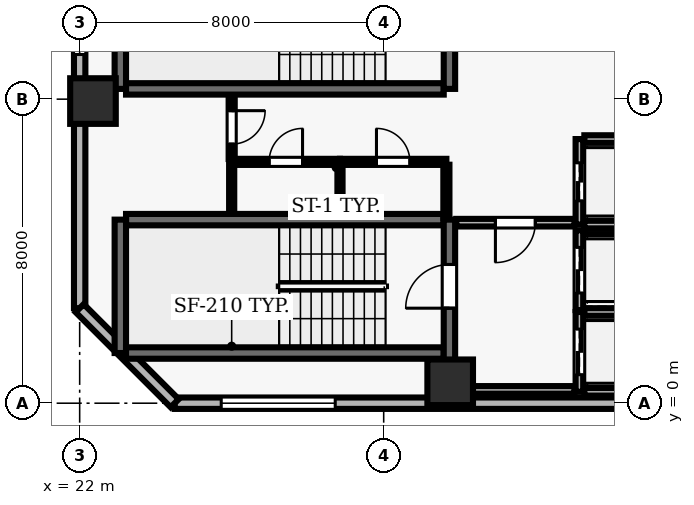
"""IFC4 building model, lengths in metres.
Left out: names, types, materials, properties, quantities, classifications, styles, units other than length and angle.
Written with IfcOpenShell. Run it as: python <this file> out.ifc"""

import sys

from ifc_helpers import new_model, si_unit, direction, frame, frame_2d, origin, origin_2d, place, context, subcontext, project, spatial, rectangle, extrude, element, fill, save


model = new_model("IFC4")
c1 = context("Model", 3, precision=1e-05, world=origin(), true_north=direction((0.0, 1.0)))
c2 = subcontext(c1, "Body", "Model", "MODEL_VIEW")
j1 = project(units=[si_unit("LENGTHUNIT", "METRE"), si_unit("PLANEANGLEUNIT", "RADIAN")], contexts=[c1])
p1 = place(None, origin())
s1 = spatial("IfcSite", under=j1, at=p1, CompositionType="ELEMENT")
p2 = place(p1, origin())
s2 = spatial("IfcBuilding", under=s1, at=p2, CompositionType="ELEMENT")
p3 = place(p2, frame((0.0, 0.0, 146.3)))
s3 = spatial("IfcBuildingStorey", under=s2, at=p3, CompositionType="ELEMENT", Elevation=146.3)
for number, where, z_axis, x_axis in (
    (1, (31.75, 0.55, 0.0), (0.0, 0.0, 1.0), (1.0, 0.0, 0.0)),
    (2, (22.35, 7.95, 0.0), (0.0, 0.0, 1.0), (1.0, 0.0, 0.0)),
):
    element("IfcColumn", number, at=place(p3, frame(where, z_axis=z_axis, x_axis=x_axis)), inside=s3, PredefinedType="COLUMN", context=c2, shape_type="SweptSolid", body=[
        extrude(rectangle(XDim=1.2, YDim=1.2, at=origin_2d()), origin(), (0.0, 0.0, 1.0), 3.9),
    ])
p4 = place(p3, frame((24.5, 0.0, 0.0), z_axis=(0.0, 0.0, 1.0), x_axis=(1.0, 0.0, 0.0)))
e3 = element("IfcWall", 3, at=p4, inside=s3, PredefinedType="SOLIDWALL", context=c2, shape_type="SweptSolid", body=[
    extrude(rectangle(XDim=43.6, YDim=0.3, at=frame_2d((21.8, 0.0))), origin(), (0.0, 0.0, 1.0), 3.69),
])
p5 = place(p4, frame((1.225, 0.0, 0.9)))
e4 = element("IfcOpeningElement", 4, at=p5, cuts=e3, PredefinedType="OPENING", context=c2, shape_type="SweptSolid", body=[
    extrude(rectangle(XDim=3.0, YDim=2.2, at=frame_2d((1.5, 1.1))), frame((0.0, 0.16, 0.0), z_axis=(0.0, -1.0, 0.0), x_axis=(1.0, 0.0, 0.0)), (0.0, 0.0, 1.0), 0.32),
])
p6 = place(p4, frame((17.575, 0.0, 0.9)))
e5 = element("IfcOpeningElement", 5, at=p6, cuts=e3, PredefinedType="OPENING", context=c2, shape_type="SweptSolid", body=[
    extrude(rectangle(XDim=3.0, YDim=2.2, at=frame_2d((1.5, 1.1))), frame((0.0, 0.16, 0.0), z_axis=(0.0, -1.0, 0.0), x_axis=(1.0, 0.0, 0.0)), (0.0, 0.0, 1.0), 0.32),
])
p7 = place(p4, frame((23.025, 0.0, 0.9)))
e6 = element("IfcOpeningElement", 6, at=p7, cuts=e3, PredefinedType="OPENING", context=c2, shape_type="SweptSolid", body=[
    extrude(rectangle(XDim=3.0, YDim=2.2, at=frame_2d((1.5, 1.1))), frame((0.0, 0.16, 0.0), z_axis=(0.0, -1.0, 0.0), x_axis=(1.0, 0.0, 0.0)), (0.0, 0.0, 1.0), 0.32),
])
p8 = place(p4, frame((28.475, 0.0, 0.9)))
e7 = element("IfcOpeningElement", 7, at=p8, cuts=e3, PredefinedType="OPENING", context=c2, shape_type="SweptSolid", body=[
    extrude(rectangle(XDim=3.0, YDim=2.2, at=frame_2d((1.5, 1.1))), frame((0.0, 0.16, 0.0), z_axis=(0.0, -1.0, 0.0), x_axis=(1.0, 0.0, 0.0)), (0.0, 0.0, 1.0), 0.32),
])
p9 = place(p4, frame((39.375, 0.0, 0.9)))
e8 = element("IfcOpeningElement", 8, at=p9, cuts=e3, PredefinedType="OPENING", context=c2, shape_type="SweptSolid", body=[
    extrude(rectangle(XDim=3.0, YDim=2.2, at=frame_2d((1.5, 1.1))), frame((0.0, 0.16, 0.0), z_axis=(0.0, -1.0, 0.0), x_axis=(1.0, 0.0, 0.0)), (0.0, 0.0, 1.0), 0.32),
])
p10 = place(p3, frame((22.0, 46.1, 0.0), z_axis=(0.0, 0.0, 1.0), x_axis=(0.0, -1.0, 0.0)))
e9 = element("IfcWall", 9, at=p10, inside=s3, PredefinedType="SOLIDWALL", context=c2, shape_type="SweptSolid", body=[
    extrude(rectangle(XDim=43.6, YDim=0.3, at=frame_2d((21.8, 0.0))), origin(), (0.0, 0.0, 1.0), 3.69),
])
p11 = place(p10, frame((12.7, 0.0, 0.0)))
e10 = element("IfcOpeningElement", 10, at=p11, cuts=e9, PredefinedType="OPENING", context=c2, shape_type="SweptSolid", body=[
    extrude(rectangle(XDim=1.0, YDim=2.2, at=frame_2d((0.5, 1.1))), frame((0.0, 0.16, 0.0), z_axis=(0.0, -1.0, 0.0), x_axis=(1.0, 0.0, 0.0)), (0.0, 0.0, 1.0), 0.32),
])
p12 = place(p10, frame((1.225, 0.0, 0.9)))
e11 = element("IfcOpeningElement", 11, at=p12, cuts=e9, PredefinedType="OPENING", context=c2, shape_type="SweptSolid", body=[
    extrude(rectangle(XDim=3.0, YDim=2.2, at=frame_2d((1.5, 1.1))), frame((0.0, 0.16, 0.0), z_axis=(0.0, -1.0, 0.0), x_axis=(1.0, 0.0, 0.0)), (0.0, 0.0, 1.0), 0.32),
])
p13 = place(p10, frame((6.675, 0.0, 0.9)))
e12 = element("IfcOpeningElement", 12, at=p13, cuts=e9, PredefinedType="OPENING", context=c2, shape_type="SweptSolid", body=[
    extrude(rectangle(XDim=3.0, YDim=2.2, at=frame_2d((1.5, 1.1))), frame((0.0, 0.16, 0.0), z_axis=(0.0, -1.0, 0.0), x_axis=(1.0, 0.0, 0.0)), (0.0, 0.0, 1.0), 0.32),
])
p14 = place(p10, frame((23.475, 0.0, 0.9)))
e13 = element("IfcOpeningElement", 13, at=p14, cuts=e9, PredefinedType="OPENING", context=c2, shape_type="SweptSolid", body=[
    extrude(rectangle(XDim=3.0, YDim=2.2, at=frame_2d((1.5, 1.1))), frame((0.0, 0.16, 0.0), z_axis=(0.0, -1.0, 0.0), x_axis=(1.0, 0.0, 0.0)), (0.0, 0.0, 1.0), 0.32),
])
p15 = place(p10, frame((33.925, 0.0, 0.9)))
e14 = element("IfcOpeningElement", 14, at=p15, cuts=e9, PredefinedType="OPENING", context=c2, shape_type="SweptSolid", body=[
    extrude(rectangle(XDim=3.0, YDim=2.2, at=frame_2d((1.5, 1.1))), frame((0.0, 0.16, 0.0), z_axis=(0.0, -1.0, 0.0), x_axis=(1.0, 0.0, 0.0)), (0.0, 0.0, 1.0), 0.32),
])
p16 = place(p3, frame((22.0, 2.5, 0.0), z_axis=(0.0, 0.0, 1.0), x_axis=(0.707106781187, -0.707106781187, 0.0)))
e15 = element("IfcWall", 15, at=p16, inside=s3, PredefinedType="SOLIDWALL", context=c2, shape_type="SweptSolid", body=[
    extrude(rectangle(XDim=3.536, YDim=0.3, at=frame_2d((1.768, 0.0))), origin(), (0.0, 0.0, 1.0), 3.69),
])
p17 = place(p3, frame((31.58, 4.83, 0.0), z_axis=(0.0, 0.0, 1.0), x_axis=(-1.0, 0.0, 0.0)))
e16 = element("IfcWall", 16, at=p17, inside=s3, PredefinedType="SHEAR", context=c2, shape_type="SweptSolid", body=[
    extrude(rectangle(XDim=8.36, YDim=0.3, at=frame_2d((4.18, 0.0))), origin(), (0.0, 0.0, 1.0), 3.69),
])
p18 = place(p3, frame((23.07, 4.83, 0.0), z_axis=(0.0, 0.0, 1.0), x_axis=(0.0, -1.0, 0.0)))
e17 = element("IfcWall", 17, at=p18, inside=s3, PredefinedType="SHEAR", context=c2, shape_type="SweptSolid", body=[
    extrude(rectangle(XDim=3.51, YDim=0.3, at=frame_2d((1.755, 0.0))), origin(), (0.0, 0.0, 1.0), 3.69),
])
p19 = place(p3, frame((23.22, 1.32, 0.0), z_axis=(0.0, 0.0, 1.0), x_axis=(1.0, 0.0, 0.0)))
e18 = element("IfcWall", 18, at=p19, inside=s3, PredefinedType="SHEAR", context=c2, shape_type="SweptSolid", body=[
    extrude(rectangle(XDim=8.36, YDim=0.3, at=frame_2d((4.18, 0.0))), origin(), (0.0, 0.0, 1.0), 3.69),
])
p20 = place(p3, frame((31.73, 0.96, 0.0), z_axis=(0.0, 0.0, 1.0), x_axis=(0.0, 1.0, 0.0)))
e19 = element("IfcWall", 19, at=p20, inside=s3, PredefinedType="SHEAR", context=c2, shape_type="SweptSolid", body=[
    extrude(rectangle(XDim=3.87, YDim=0.3, at=frame_2d((1.935, 0.0))), origin(), (0.0, 0.0, 1.0), 3.69),
])
p21 = place(p20, frame((1.54, 0.0, 0.0)))
e20 = element("IfcOpeningElement", 20, at=p21, cuts=e19, PredefinedType="OPENING", context=c2, shape_type="SweptSolid", body=[
    extrude(rectangle(XDim=1.15, YDim=2.15, at=frame_2d((0.575, 1.075))), frame((0.0, 0.16, 0.0), z_axis=(0.0, -1.0, 0.0), x_axis=(1.0, 0.0, 0.0)), (0.0, 0.0, 1.0), 0.32),
])
p22 = place(p3, frame((23.07, 11.78, 0.0), z_axis=(0.0, 0.0, 1.0), x_axis=(0.0, -1.0, 0.0)))
e21 = element("IfcWall", 21, at=p22, inside=s3, PredefinedType="SHEAR", context=c2, shape_type="SweptSolid", body=[
    extrude(rectangle(XDim=3.51, YDim=0.3, at=frame_2d((1.755, 0.0))), origin(), (0.0, 0.0, 1.0), 3.69),
])
p23 = place(p3, frame((23.22, 8.27, 0.0), z_axis=(0.0, 0.0, 1.0), x_axis=(1.0, 0.0, 0.0)))
e22 = element("IfcWall", 22, at=p23, inside=s3, PredefinedType="SHEAR", context=c2, shape_type="SweptSolid", body=[
    extrude(rectangle(XDim=8.36, YDim=0.3, at=frame_2d((4.18, 0.0))), origin(), (0.0, 0.0, 1.0), 3.69),
])
p24 = place(p3, frame((31.73, 8.27, 0.0), z_axis=(0.0, 0.0, 1.0), x_axis=(0.0, 1.0, 0.0)))
e23 = element("IfcWall", 23, at=p24, inside=s3, PredefinedType="SHEAR", context=c2, shape_type="SweptSolid", body=[
    extrude(rectangle(XDim=3.51, YDim=0.3, at=frame_2d((1.755, 0.0))), origin(), (0.0, 0.0, 1.0), 3.69),
])
p25 = place(p24, frame((1.18, 0.0, 0.0)))
e24 = element("IfcOpeningElement", 24, at=p25, cuts=e23, PredefinedType="OPENING", context=c2, shape_type="SweptSolid", body=[
    extrude(rectangle(XDim=1.15, YDim=2.15, at=frame_2d((0.575, 1.075))), frame((0.0, 0.16, 0.0), z_axis=(0.0, -1.0, 0.0), x_axis=(1.0, 0.0, 0.0)), (0.0, 0.0, 1.0), 0.32),
])
p26 = place(p3, frame((35.15, 2.4, 0.0), z_axis=(0.0, 0.0, 1.0), x_axis=(0.0, -1.0, 0.0)))
e25 = element("IfcWall", 25, at=p26, inside=s3, PredefinedType="SOLIDWALL", context=c2, shape_type="SweptSolid", body=[
    extrude(rectangle(XDim=2.1, YDim=0.2, at=frame_2d((1.05, 0.0))), origin(), (0.0, 0.0, 1.0), 3.69),
])
p27 = place(p26, frame((0.45, 0.0, 0.0)))
e26 = element("IfcOpeningElement", 26, at=p27, cuts=e25, PredefinedType="OPENING", context=c2, shape_type="SweptSolid", body=[
    extrude(rectangle(XDim=1.2, YDim=2.15, at=frame_2d((0.6, 1.075))), frame((0.0, 0.11, 0.0), z_axis=(0.0, -1.0, 0.0), x_axis=(1.0, 0.0, 0.0)), (0.0, 0.0, 1.0), 0.22),
])
for number, where, z_axis, x_axis in (
    (27, (35.28, 0.3, 0.0), (0.0, 0.0, 1.0), (1.0, 0.0, 0.0)),
    (28, (37.42, 2.4, 0.0), (0.0, 0.0, 1.0), (-1.0, 0.0, 0.0)),
):
    element("IfcWall", number, at=place(p3, frame(where, z_axis=z_axis, x_axis=x_axis)), inside=s3, PredefinedType="SOLIDWALL", context=c2, shape_type="SweptSolid", body=[
        extrude(rectangle(XDim=2.14, YDim=0.2, at=frame_2d((1.07, 0.0))), origin(), (0.0, 0.0, 1.0), 3.69),
    ])
p28 = place(p3, frame((35.15, 4.55, 0.0), z_axis=(0.0, 0.0, 1.0), x_axis=(0.0, -1.0, 0.0)))
e29 = element("IfcWall", 29, at=p28, inside=s3, PredefinedType="SOLIDWALL", context=c2, shape_type="SweptSolid", body=[
    extrude(rectangle(XDim=2.1, YDim=0.2, at=frame_2d((1.05, 0.0))), origin(), (0.0, 0.0, 1.0), 3.69),
])
p29 = place(p28, frame((0.45, 0.0, 0.0)))
e30 = element("IfcOpeningElement", 30, at=p29, cuts=e29, PredefinedType="OPENING", context=c2, shape_type="SweptSolid", body=[
    extrude(rectangle(XDim=1.2, YDim=2.15, at=frame_2d((0.6, 1.075))), frame((0.0, 0.11, 0.0), z_axis=(0.0, -1.0, 0.0), x_axis=(1.0, 0.0, 0.0)), (0.0, 0.0, 1.0), 0.22),
])
p30 = place(p3, frame((37.42, 4.55, 0.0), z_axis=(0.0, 0.0, 1.0), x_axis=(-1.0, 0.0, 0.0)))
e31 = element("IfcWall", 31, at=p30, inside=s3, PredefinedType="SOLIDWALL", context=c2, shape_type="SweptSolid", body=[
    extrude(rectangle(XDim=2.14, YDim=0.2, at=frame_2d((1.07, 0.0))), origin(), (0.0, 0.0, 1.0), 3.69),
])
p31 = place(p3, frame((35.15, 6.95, 0.0), z_axis=(0.0, 0.0, 1.0), x_axis=(0.0, -1.0, 0.0)))
e32 = element("IfcWall", 32, at=p31, inside=s3, PredefinedType="SOLIDWALL", context=c2, shape_type="SweptSolid", body=[
    extrude(rectangle(XDim=2.25, YDim=0.2, at=frame_2d((1.125, 0.0))), origin(), (0.0, 0.0, 1.0), 3.69),
])
p32 = place(p31, frame((0.625, 0.0, 0.0)))
e33 = element("IfcOpeningElement", 33, at=p32, cuts=e32, PredefinedType="OPENING", context=c2, shape_type="SweptSolid", body=[
    extrude(rectangle(XDim=1.0, YDim=2.1, at=frame_2d((0.5, 1.05))), frame((0.0, 0.11, 0.0), z_axis=(0.0, -1.0, 0.0), x_axis=(1.0, 0.0, 0.0)), (0.0, 0.0, 1.0), 0.22),
])
for number, where, z_axis, x_axis in (
    (34, (35.28, 4.7, 0.0), (0.0, 0.0, 1.0), (1.0, 0.0, 0.0)),
    (35, (37.42, 6.95, 0.0), (0.0, 0.0, 1.0), (-1.0, 0.0, 0.0)),
):
    element("IfcWall", number, at=place(p3, frame(where, z_axis=z_axis, x_axis=x_axis)), inside=s3, PredefinedType="SOLIDWALL", context=c2, shape_type="SweptSolid", body=[
        extrude(rectangle(XDim=2.14, YDim=0.2, at=frame_2d((1.07, 0.0))), origin(), (0.0, 0.0, 1.0), 3.69),
    ])
p33 = place(p3, frame((26.0, 6.35, 0.0), z_axis=(0.0, 0.0, 1.0), x_axis=(1.0, 0.0, 0.0)))
e36 = element("IfcWall", 36, at=p33, inside=s3, PredefinedType="PARTITIONING", context=c2, shape_type="SweptSolid", body=[
    extrude(rectangle(XDim=2.85, YDim=0.16, at=frame_2d((1.425, 0.0))), origin(), (0.0, 0.0, 1.0), 3.69),
])
p34 = place(p33, frame((0.985, 0.0, 0.0)))
e37 = element("IfcOpeningElement", 37, at=p34, cuts=e36, PredefinedType="OPENING", context=c2, shape_type="SweptSolid", body=[
    extrude(rectangle(XDim=0.88, YDim=2.1, at=frame_2d((0.44, 1.05))), frame((0.0, 0.09, 0.0), z_axis=(0.0, -1.0, 0.0), x_axis=(1.0, 0.0, 0.0)), (0.0, 0.0, 1.0), 0.18),
])
p35 = place(p3, frame((28.85, 6.35, 0.0), z_axis=(0.0, 0.0, 1.0), x_axis=(1.0, 0.0, 0.0)))
e38 = element("IfcWall", 38, at=p35, inside=s3, PredefinedType="PARTITIONING", context=c2, shape_type="SweptSolid", body=[
    extrude(rectangle(XDim=2.8, YDim=0.16, at=frame_2d((1.4, 0.0))), origin(), (0.0, 0.0, 1.0), 3.69),
])
p36 = place(p35, frame((0.96, 0.0, 0.0)))
e39 = element("IfcOpeningElement", 39, at=p36, cuts=e38, PredefinedType="OPENING", context=c2, shape_type="SweptSolid", body=[
    extrude(rectangle(XDim=0.88, YDim=2.1, at=frame_2d((0.44, 1.05))), frame((0.0, 0.09, 0.0), z_axis=(0.0, -1.0, 0.0), x_axis=(1.0, 0.0, 0.0)), (0.0, 0.0, 1.0), 0.18),
])
p37 = place(p3, frame((31.65, 0.35, 0.0), z_axis=(0.0, 0.0, 1.0), x_axis=(1.0, 0.0, 0.0)))
e40 = element("IfcWall", 40, at=p37, inside=s3, PredefinedType="SOLIDWALL", context=c2, shape_type="SweptSolid", body=[
    extrude(rectangle(XDim=3.37, YDim=0.2, at=frame_2d((1.685, 0.0))), origin(), (0.0, 0.0, 1.0), 3.69),
])
p38 = place(p3, frame((35.02, 4.75, 0.0), z_axis=(0.0, 0.0, 1.0), x_axis=(-1.0, 0.0, 0.0)))
e41 = element("IfcWall", 41, at=p38, inside=s3, PredefinedType="SOLIDWALL", context=c2, shape_type="SweptSolid", body=[
    extrude(rectangle(XDim=3.11, YDim=0.2, at=frame_2d((1.555, 0.0))), origin(), (0.0, 0.0, 1.0), 3.69),
])
p39 = place(p38, frame((1.03, 0.0, 0.0)))
e42 = element("IfcOpeningElement", 42, at=p39, cuts=e41, PredefinedType="OPENING", context=c2, shape_type="SweptSolid", body=[
    extrude(rectangle(XDim=1.05, YDim=2.15, at=frame_2d((0.525, 1.075))), frame((0.0, 0.11, 0.0), z_axis=(0.0, -1.0, 0.0), x_axis=(1.0, 0.0, 0.0)), (0.0, 0.0, 1.0), 0.22),
])
p40 = place(p3, frame((26.0, 5.01, 0.0), z_axis=(0.0, 0.0, 1.0), x_axis=(0.0, 1.0, 0.0)))
e43 = element("IfcWall", 43, at=p40, inside=s3, PredefinedType="PARTITIONING", context=c2, shape_type="SweptSolid", body=[
    extrude(rectangle(XDim=1.265, YDim=0.135, at=frame_2d((0.632, 0.0))), origin(), (0.0, 0.0, 1.0), 3.69),
])
p41 = place(p3, frame((26.0, 8.09, 0.0), z_axis=(0.0, 0.0, 1.0), x_axis=(0.0, -1.0, 0.0)))
e44 = element("IfcWall", 44, at=p41, inside=s3, PredefinedType="PARTITIONING", context=c2, shape_type="SweptSolid", body=[
    extrude(rectangle(XDim=1.665, YDim=0.16, at=frame_2d((0.833, 0.0))), origin(), (0.0, 0.0, 1.0), 3.69),
])
p42 = place(p41, frame((0.393, 0.0, 0.0)))
e45 = element("IfcOpeningElement", 45, at=p42, cuts=e44, PredefinedType="OPENING", context=c2, shape_type="SweptSolid", body=[
    extrude(rectangle(XDim=0.88, YDim=2.1, at=frame_2d((0.44, 1.05))), frame((0.0, 0.09, 0.0), z_axis=(0.0, -1.0, 0.0), x_axis=(1.0, 0.0, 0.0)), (0.0, 0.0, 1.0), 0.18),
])
p43 = place(p3, frame((28.85, 5.01, 0.0), z_axis=(0.0, 0.0, 1.0), x_axis=(0.0, 1.0, 0.0)))
e46 = element("IfcWall", 46, at=p43, inside=s3, PredefinedType="PARTITIONING", context=c2, shape_type="SweptSolid", body=[
    extrude(rectangle(XDim=1.265, YDim=0.135, at=frame_2d((0.632, 0.0))), origin(), (0.0, 0.0, 1.0), 3.69),
])
p44 = place(p3, frame((31.65, 4.86, 0.0), z_axis=(0.0, 0.0, 1.0), x_axis=(0.0, 1.0, 0.0)))
e47 = element("IfcWall", 47, at=p44, inside=s3, PredefinedType="PARTITIONING", context=c2, shape_type="SweptSolid", body=[
    extrude(rectangle(XDim=1.415, YDim=0.16, at=frame_2d((0.708, 0.0))), origin(), (0.0, 0.0, 1.0), 3.69),
])
p45 = place(p5, origin())
e48 = element("IfcWindow", 48, at=p45, inside=s3, PartitioningType="SINGLE_PANEL", PredefinedType="WINDOW", context=c2, shape_type="SweptSolid", body=[
    extrude(rectangle(XDim=3.0, YDim=2.2, at=frame_2d((1.5, 1.1))), frame((0.0, 0.03, 0.0), z_axis=(0.0, -1.0, 0.0), x_axis=(1.0, 0.0, 0.0)), (0.0, 0.0, 1.0), 0.06),
])
fill(e4, e48)
p46 = place(p15, origin())
e49 = element("IfcWindow", 49, at=p46, inside=s3, PartitioningType="SINGLE_PANEL", PredefinedType="WINDOW", context=c2, shape_type="SweptSolid", body=[
    extrude(rectangle(XDim=3.0, YDim=2.2, at=frame_2d((1.5, 1.1))), frame((0.0, 0.03, 0.0), z_axis=(0.0, -1.0, 0.0), x_axis=(1.0, 0.0, 0.0)), (0.0, 0.0, 1.0), 0.06),
])
fill(e14, e49)
p47 = place(p21, origin())
e50 = element("IfcDoor", 50, at=p47, inside=s3, OperationType="SINGLE_SWING_LEFT", PredefinedType="DOOR", context=c2, shape_type="SweptSolid", body=[
    extrude(rectangle(XDim=1.15, YDim=2.15, at=frame_2d((0.575, 1.075))), frame((0.0, 0.025, 0.0), z_axis=(0.0, -1.0, 0.0), x_axis=(1.0, 0.0, 0.0)), (0.0, 0.0, 1.0), 0.05),
])
fill(e20, e50)
p48 = place(p27, origin())
e51 = element("IfcDoor", 51, at=p48, inside=s3, OperationType="DOUBLE_DOOR_SLIDING", PredefinedType="DOOR", context=c2, shape_type="SweptSolid", body=[
    extrude(rectangle(XDim=1.2, YDim=2.15, at=frame_2d((0.6, 1.075))), frame((0.0, 0.025, 0.0), z_axis=(0.0, -1.0, 0.0), x_axis=(1.0, 0.0, 0.0)), (0.0, 0.0, 1.0), 0.05),
])
fill(e26, e51)
p49 = place(p29, origin())
e52 = element("IfcDoor", 52, at=p49, inside=s3, OperationType="DOUBLE_DOOR_SLIDING", PredefinedType="DOOR", context=c2, shape_type="SweptSolid", body=[
    extrude(rectangle(XDim=1.2, YDim=2.15, at=frame_2d((0.6, 1.075))), frame((0.0, 0.025, 0.0), z_axis=(0.0, -1.0, 0.0), x_axis=(1.0, 0.0, 0.0)), (0.0, 0.0, 1.0), 0.05),
])
fill(e30, e52)
p50 = place(p32, origin())
e53 = element("IfcDoor", 53, at=p50, inside=s3, OperationType="DOUBLE_DOOR_SLIDING", PredefinedType="DOOR", context=c2, shape_type="SweptSolid", body=[
    extrude(rectangle(XDim=1.0, YDim=2.1, at=frame_2d((0.5, 1.05))), frame((0.0, 0.025, 0.0), z_axis=(0.0, -1.0, 0.0), x_axis=(1.0, 0.0, 0.0)), (0.0, 0.0, 1.0), 0.05),
])
fill(e33, e53)
p51 = place(p39, origin())
e54 = element("IfcDoor", 54, at=p51, inside=s3, OperationType="SINGLE_SWING_RIGHT", PredefinedType="DOOR", context=c2, shape_type="SweptSolid", body=[
    extrude(rectangle(XDim=1.05, YDim=2.15, at=frame_2d((0.525, 1.075))), frame((0.0, 0.025, 0.0), z_axis=(0.0, -1.0, 0.0), x_axis=(1.0, 0.0, 0.0)), (0.0, 0.0, 1.0), 0.05),
])
fill(e42, e54)
p52 = place(p42, origin())
e55 = element("IfcDoor", 55, at=p52, inside=s3, OperationType="SINGLE_SWING_LEFT", PredefinedType="DOOR", context=c2, shape_type="SweptSolid", body=[
    extrude(rectangle(XDim=0.88, YDim=2.1, at=frame_2d((0.44, 1.05))), frame((0.0, 0.025, 0.0), z_axis=(0.0, -1.0, 0.0), x_axis=(1.0, 0.0, 0.0)), (0.0, 0.0, 1.0), 0.05),
])
fill(e45, e55)
p53 = place(p34, origin())
e56 = element("IfcDoor", 56, at=p53, inside=s3, OperationType="SINGLE_SWING_RIGHT", PredefinedType="DOOR", context=c2, shape_type="SweptSolid", body=[
    extrude(rectangle(XDim=0.88, YDim=2.1, at=frame_2d((0.44, 1.05))), frame((0.0, 0.025, 0.0), z_axis=(0.0, -1.0, 0.0), x_axis=(1.0, 0.0, 0.0)), (0.0, 0.0, 1.0), 0.05),
])
fill(e37, e56)
p54 = place(p36, origin())
e57 = element("IfcDoor", 57, at=p54, inside=s3, OperationType="SINGLE_SWING_LEFT", PredefinedType="DOOR", context=c2, shape_type="SweptSolid", body=[
    extrude(rectangle(XDim=0.88, YDim=2.1, at=frame_2d((0.44, 1.05))), frame((0.0, 0.025, 0.0), z_axis=(0.0, -1.0, 0.0), x_axis=(1.0, 0.0, 0.0)), (0.0, 0.0, 1.0), 0.05),
])
fill(e39, e57)
save(model, sys.argv[1])
